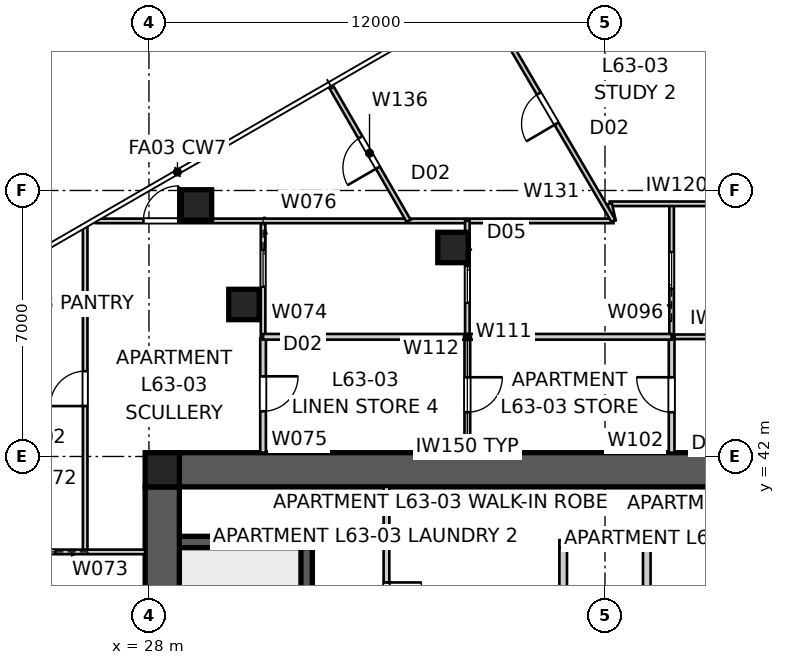
"""IFC4 building model, lengths in metres.
Left out: names, types, materials, properties, quantities, classifications, styles, units other than length and angle.
Written with IfcOpenShell. Run it as: python <this file> out.ifc"""

import sys

from ifc_helpers import new_model, si_unit, direction, frame, frame_2d, origin, origin_2d, place, context, subcontext, project, spatial, polyline, rectangle, outline, extrude, element, fill, save


model = new_model("IFC4")
c1 = context("Model", 3, precision=1e-05, world=origin(), true_north=direction((0.0, 1.0)))
c2 = subcontext(c1, "Body", "Model", "MODEL_VIEW")
j1 = project(units=[si_unit("LENGTHUNIT", "METRE"), si_unit("PLANEANGLEUNIT", "RADIAN")], contexts=[c1])
p1 = place(None, origin())
s1 = spatial("IfcSite", under=j1, at=p1, CompositionType="ELEMENT")
p2 = place(p1, origin())
s2 = spatial("IfcBuilding", under=s1, at=p2, CompositionType="ELEMENT")
p3 = place(p2, frame((0.0, 0.0, 228.6)))
s3 = spatial("IfcBuildingStorey", under=s2, at=p3, CompositionType="ELEMENT", Elevation=228.6)
p4 = place(p3, frame((28.8, 41.65, 0.0), z_axis=(0.0, 0.0, 1.0), x_axis=(1.0, 0.0, 0.0)))
e1 = element("IfcWall", 1, at=p4, inside=s3, PredefinedType="SHEAR", context=c2, shape_type="SweptSolid", body=[
    extrude(outline(polyline([(0.0, -0.45), (22.4, -0.45), (22.4, -0.025), (22.85, -0.025), (22.85, 0.025), (22.4, 0.025), (22.4, 0.45), (0.0, 0.45), (0.0, 0.025), (-0.45, 0.025), (-0.45, -0.025), (0.0, -0.025), (0.0, -0.45)])), origin(), (0.0, 0.0, 1.0), 3.4),
])
p5 = place(p3, frame((28.35, 41.2, 0.0), z_axis=(0.0, 0.0, 1.0), x_axis=(0.0, -1.0, 0.0)))
e2 = element("IfcWall", 2, at=p5, inside=s3, PredefinedType="SHEAR", context=c2, shape_type="SweptSolid", body=[
    extrude(outline(polyline([(0.0, -0.45), (22.4, -0.45), (22.4, -0.025), (22.85, -0.025), (22.85, 0.025), (22.4, 0.025), (22.4, 0.45), (0.0, 0.45), (0.0, 0.025), (-0.45, 0.025), (-0.45, -0.025), (0.0, -0.025), (0.0, -0.45)])), origin(), (0.0, 0.0, 1.0), 3.4),
])
p6 = place(p5, frame((11.14, 0.0, 0.0)))
e3 = element("IfcOpeningElement", 3, at=p6, cuts=e2, PredefinedType="OPENING", context=c2, shape_type="SweptSolid", body=[
    extrude(rectangle(XDim=1.02, YDim=2.4, at=frame_2d((0.51, 1.2))), frame((0.0, 0.46, 0.0), z_axis=(0.0, -1.0, 0.0), x_axis=(1.0, 0.0, 0.0)), (0.0, 0.0, 1.0), 0.92),
])
p7 = place(p3, frame((32.15, 32.2, 0.0), z_axis=(0.0, 0.0, 1.0), x_axis=(0.0, 1.0, 0.0)))
e4 = element("IfcWall", 4, at=p7, inside=s3, PredefinedType="SHEAR", context=c2, shape_type="SweptSolid", body=[
    extrude(rectangle(XDim=7.7, YDim=0.3, at=frame_2d((3.85, 0.0))), origin(), (0.0, 0.0, 1.0), 3.4),
])
p8 = place(p3, frame((28.8, 39.75, 0.0), z_axis=(0.0, 0.0, 1.0), x_axis=(1.0, 0.0, 0.0)))
e5 = element("IfcWall", 5, at=p8, inside=s3, PredefinedType="SHEAR", context=c2, shape_type="SweptSolid", body=[
    extrude(rectangle(XDim=3.5, YDim=0.3, at=frame_2d((1.75, 0.0))), origin(), (0.0, 0.0, 1.0), 3.4),
])
for number, where, z_axis, x_axis in (
    (6, (38.9, 37.6, 0.0), (0.0, 0.0, 1.0), (0.0, 1.0, 0.0)),
    (7, (41.1, 37.6, 0.0), (0.0, 0.0, 1.0), (0.0, 1.0, 0.0)),
):
    element("IfcWall", number, at=place(p3, frame(where, z_axis=z_axis, x_axis=x_axis)), inside=s3, PredefinedType="SOLIDWALL", context=c2, shape_type="SweptSolid", body=[
        extrude(rectangle(XDim=2.0, YDim=0.2, at=frame_2d((1.0, 0.0))), origin(), (0.0, 0.0, 1.0), 3.4),
    ])
p9 = place(p3, frame((38.8, 39.7, 0.0), z_axis=(0.0, 0.0, 1.0), x_axis=(1.0, 0.0, 0.0)))
e8 = element("IfcWall", 8, at=p9, inside=s3, PredefinedType="SOLIDWALL", context=c2, shape_type="SweptSolid", body=[
    extrude(rectangle(XDim=2.4, YDim=0.2, at=frame_2d((1.2, 0.0))), origin(), (0.0, 0.0, 1.0), 3.4),
])
p10 = place(p3, frame((28.35, 41.65, 0.0), z_axis=(0.0, 0.0, 1.0), x_axis=(1.0, 0.0, 0.0)))
e9 = element("IfcColumn", 9, at=p10, inside=s3, PredefinedType="COLUMN", context=c2, shape_type="SweptSolid", body=[
    extrude(rectangle(XDim=0.9, YDim=0.9, at=origin_2d()), origin(), (0.0, 0.0, 1.0), 3.4),
])
for number, where, z_axis, x_axis in (
    (10, (29.25, 48.62, 0.0), (0.0, 0.0, 1.0), (1.0, 0.0, 0.0)),
    (11, (36.0, 47.5, 0.0), (0.0, 0.0, 1.0), (1.0, 0.0, 0.0)),
    (12, (30.5, 46.0, 0.0), (0.0, 0.0, 1.0), (1.0, 0.0, 0.0)),
):
    element("IfcColumn", number, at=place(p3, frame(where, z_axis=z_axis, x_axis=x_axis)), inside=s3, PredefinedType="COLUMN", context=c2, shape_type="SweptSolid", body=[
        extrude(rectangle(XDim=0.8, YDim=0.8, at=origin_2d()), origin(), (0.0, 0.0, 1.0), 3.4),
    ])
p11 = place(p3, frame((34.25, 41.2, 0.0), z_axis=(0.0, 0.0, 1.0), x_axis=(0.0, -1.0, 0.0)))
e13 = element("IfcWall", 13, at=p11, inside=s3, PredefinedType="SOLIDWALL", context=c2, shape_type="SweptSolid", body=[
    extrude(rectangle(XDim=5.95, YDim=0.15, at=frame_2d((2.975, 0.0))), origin(), (0.0, 0.0, 1.0), 3.25),
])
p12 = place(p11, frame((2.515, 0.0, 0.0)))
e14 = element("IfcOpeningElement", 14, at=p12, cuts=e13, PredefinedType="OPENING", context=c2, shape_type="SweptSolid", body=[
    extrude(rectangle(XDim=0.92, YDim=2.1, at=frame_2d((0.46, 1.05))), frame((0.0, 0.085, 0.0), z_axis=(0.0, -1.0, 0.0), x_axis=(1.0, 0.0, 0.0)), (0.0, 0.0, 1.0), 0.17),
])
p13 = place(p3, frame((26.322, 39.49, 0.0), z_axis=(0.0, 0.0, 1.0), x_axis=(0.0, 1.0, 0.0)))
e15 = element("IfcWall", 15, at=p13, inside=s3, PredefinedType="PARTITIONING", context=c2, shape_type="SweptSolid", body=[
    extrude(rectangle(XDim=8.548, YDim=0.12, at=frame_2d((4.274, 0.0))), origin(), (0.0, 0.0, 1.0), 3.25),
])
p14 = place(p13, frame((3.837, 0.0, 0.0)))
e16 = element("IfcOpeningElement", 16, at=p14, cuts=e15, PredefinedType="OPENING", context=c2, shape_type="SweptSolid", body=[
    extrude(rectangle(XDim=0.92, YDim=2.34, at=frame_2d((0.46, 1.17))), frame((0.0, 0.07, 0.0), z_axis=(0.0, -1.0, 0.0), x_axis=(1.0, 0.0, 0.0)), (0.0, 0.0, 1.0), 0.14),
])
p15 = place(p3, frame((27.9, 39.49, 0.0), z_axis=(0.0, 0.0, 1.0), x_axis=(-1.0, 0.0, 0.0)))
e17 = element("IfcWall", 17, at=p15, inside=s3, PredefinedType="PARTITIONING", context=c2, shape_type="SweptSolid", body=[
    extrude(rectangle(XDim=4.116, YDim=0.12, at=frame_2d((2.058, 0.0))), origin(), (0.0, 0.0, 1.0), 3.25),
])
p16 = place(p15, frame((2.367, 0.0, 0.0)))
e18 = element("IfcOpeningElement", 18, at=p16, cuts=e17, PredefinedType="OPENING", context=c2, shape_type="SweptSolid", body=[
    extrude(rectangle(XDim=0.96, YDim=2.1, at=frame_2d((0.48, 1.05))), frame((0.0, 0.07, 0.0), z_axis=(0.0, -1.0, 0.0), x_axis=(1.0, 0.0, 0.0)), (0.0, 0.0, 1.0), 0.14),
])
p17 = place(p3, frame((31.003, 48.2, 0.0), z_axis=(0.0, 0.0, 1.0), x_axis=(0.0, -1.0, 0.0)))
e19 = element("IfcWall", 19, at=p17, inside=s3, PredefinedType="PARTITIONING", context=c2, shape_type="SweptSolid", body=[
    extrude(rectangle(XDim=3.1, YDim=0.12, at=frame_2d((1.55, 0.0))), origin(), (0.0, 0.0, 1.0), 3.25),
])
p18 = place(p17, frame((0.77, 0.0, 0.0)))
e20 = element("IfcOpeningElement", 20, at=p18, cuts=e19, PredefinedType="OPENING", context=c2, shape_type="SweptSolid", body=[
    extrude(rectangle(XDim=0.96, YDim=2.1, at=frame_2d((0.48, 1.05))), frame((0.0, 0.07, 0.0), z_axis=(0.0, -1.0, 0.0), x_axis=(1.0, 0.0, 0.0)), (0.0, 0.0, 1.0), 0.14),
])
p19 = place(p3, frame((31.003, 45.1, 0.0), z_axis=(0.0, 0.0, 1.0), x_axis=(0.0, -1.0, 0.0)))
e21 = element("IfcWall", 21, at=p19, inside=s3, PredefinedType="SOLIDWALL", context=c2, shape_type="SweptSolid", body=[
    extrude(rectangle(XDim=3.0, YDim=0.15, at=frame_2d((1.5, 0.0))), origin(), (0.0, 0.0, 1.0), 3.25),
])
p20 = place(p19, frame((0.99, 0.0, 0.0)))
e22 = element("IfcOpeningElement", 22, at=p20, cuts=e21, PredefinedType="OPENING", context=c2, shape_type="SweptSolid", body=[
    extrude(rectangle(XDim=0.92, YDim=2.34, at=frame_2d((0.46, 1.17))), frame((0.0, 0.085, 0.0), z_axis=(0.0, -1.0, 0.0), x_axis=(1.0, 0.0, 0.0)), (0.0, 0.0, 1.0), 0.17),
])
p21 = place(p3, frame((26.603, 48.2, 0.0), z_axis=(0.0, 0.0, 1.0), x_axis=(1.0, 0.0, 0.0)))
e23 = element("IfcWall", 23, at=p21, inside=s3, PredefinedType="PARTITIONING", context=c2, shape_type="SweptSolid", body=[
    extrude(rectangle(XDim=13.62, YDim=0.12, at=frame_2d((6.81, 0.0))), origin(), (0.0, 0.0, 1.0), 3.25),
])
p22 = place(p21, frame((1.25, 0.0, 0.0)))
e24 = element("IfcOpeningElement", 24, at=p22, cuts=e23, PredefinedType="OPENING", context=c2, shape_type="SweptSolid", body=[
    extrude(rectangle(XDim=0.92, YDim=2.1, at=frame_2d((0.46, 1.05))), frame((0.0, 0.07, 0.0), z_axis=(0.0, -1.0, 0.0), x_axis=(1.0, 0.0, 0.0)), (0.0, 0.0, 1.0), 0.14),
])
p23 = place(p3, frame((46.074, 45.15, 0.0), z_axis=(0.0, 0.0, 1.0), x_axis=(-1.0, 0.0, 0.0)))
e25 = element("IfcWall", 25, at=p23, inside=s3, PredefinedType="PARTITIONING", context=c2, shape_type="SweptSolid", body=[
    extrude(rectangle(XDim=4.321, YDim=0.12, at=frame_2d((2.16, 0.0))), origin(), (0.0, 0.0, 1.0), 3.25),
])
p24 = place(p3, frame((41.753, 45.15, 0.0), z_axis=(0.0, 0.0, 1.0), x_axis=(0.0, 1.0, 0.0)))
e26 = element("IfcWall", 26, at=p24, inside=s3, PredefinedType="PARTITIONING", context=c2, shape_type="SweptSolid", body=[
    extrude(rectangle(XDim=3.5, YDim=0.12, at=frame_2d((1.75, 0.0))), origin(), (0.0, 0.0, 1.0), 3.25),
])
p25 = place(p24, frame((1.27, 0.0, 0.0)))
e27 = element("IfcOpeningElement", 27, at=p25, cuts=e26, PredefinedType="OPENING", context=c2, shape_type="SweptSolid", body=[
    extrude(rectangle(XDim=0.96, YDim=2.1, at=frame_2d((0.48, 1.05))), frame((0.0, 0.07, 0.0), z_axis=(0.0, -1.0, 0.0), x_axis=(1.0, 0.0, 0.0)), (0.0, 0.0, 1.0), 0.14),
])
p26 = place(p3, frame((40.123, 48.65, 0.0), z_axis=(0.0, 0.0, 1.0), x_axis=(1.0, 0.0, 0.0)))
e28 = element("IfcWall", 28, at=p26, inside=s3, PredefinedType="PARTITIONING", context=c2, shape_type="SweptSolid", body=[
    extrude(rectangle(XDim=3.53, YDim=0.12, at=frame_2d((1.765, 0.0))), origin(), (0.0, 0.0, 1.0), 3.25),
])
p27 = place(p3, frame((40.786, 56.388, 0.0), z_axis=(0.0, 0.0, 1.0), x_axis=(0.49999364752, -0.86602907136, 0.0)))
e29 = element("IfcWall", 29, at=p27, inside=s3, PredefinedType="PARTITIONING", context=c2, shape_type="SweptSolid", body=[
    extrude(rectangle(XDim=9.455, YDim=0.12, at=frame_2d((4.728, 0.0))), origin(), (0.0, 0.0, 1.0), 3.25),
])
p28 = place(p27, frame((1.681, 0.0, 0.0)))
e30 = element("IfcOpeningElement", 30, at=p28, cuts=e29, PredefinedType="OPENING", context=c2, shape_type="SweptSolid", body=[
    extrude(rectangle(XDim=0.92, YDim=2.34, at=frame_2d((0.46, 1.17))), frame((0.0, 0.07, 0.0), z_axis=(0.0, -1.0, 0.0), x_axis=(1.0, 0.0, 0.0)), (0.0, 0.0, 1.0), 0.14),
])
p29 = place(p27, frame((5.726, 0.0, 0.0)))
e31 = element("IfcOpeningElement", 31, at=p29, cuts=e29, PredefinedType="OPENING", context=c2, shape_type="SweptSolid", body=[
    extrude(rectangle(XDim=0.92, YDim=2.34, at=frame_2d((0.46, 1.17))), frame((0.0, 0.07, 0.0), z_axis=(0.0, -1.0, 0.0), x_axis=(1.0, 0.0, 0.0)), (0.0, 0.0, 1.0), 0.14),
])
p30 = place(p3, frame((41.753, 42.1, 0.0), z_axis=(0.0, 0.0, 1.0), x_axis=(0.0, 1.0, 0.0)))
e32 = element("IfcWall", 32, at=p30, inside=s3, PredefinedType="SOLIDWALL", context=c2, shape_type="SweptSolid", body=[
    extrude(rectangle(XDim=3.05, YDim=0.15, at=frame_2d((1.525, 0.0))), origin(), (0.0, 0.0, 1.0), 3.25),
])
p31 = place(p30, frame((1.065, 0.0, 0.0)))
e33 = element("IfcOpeningElement", 33, at=p31, cuts=e32, PredefinedType="OPENING", context=c2, shape_type="SweptSolid", body=[
    extrude(rectangle(XDim=0.92, YDim=2.34, at=frame_2d((0.46, 1.17))), frame((0.0, 0.085, 0.0), z_axis=(0.0, -1.0, 0.0), x_axis=(1.0, 0.0, 0.0)), (0.0, 0.0, 1.0), 0.17),
])
p32 = place(p3, frame((41.753, 45.15, 0.0), z_axis=(0.0, 0.0, 1.0), x_axis=(-1.0, 0.0, 0.0)))
e34 = element("IfcWall", 34, at=p32, inside=s3, PredefinedType="SOLIDWALL", context=c2, shape_type="SweptSolid", body=[
    extrude(rectangle(XDim=10.751, YDim=0.15, at=frame_2d((5.375, 0.0))), origin(), (0.0, 0.0, 1.0), 3.25),
])
p33 = place(p3, frame((36.378, 48.2, 0.0), z_axis=(0.0, 0.0, 1.0), x_axis=(0.0, -1.0, 0.0)))
e35 = element("IfcWall", 35, at=p33, inside=s3, PredefinedType="PARTITIONING", context=c2, shape_type="SweptSolid", body=[
    extrude(rectangle(XDim=3.05, YDim=0.12, at=frame_2d((1.525, 0.0))), origin(), (0.0, 0.0, 1.0), 3.25),
])
p34 = place(p33, frame((1.195, 0.0, 0.0)))
e36 = element("IfcOpeningElement", 36, at=p34, cuts=e35, PredefinedType="OPENING", context=c2, shape_type="SweptSolid", body=[
    extrude(rectangle(XDim=0.96, YDim=2.1, at=frame_2d((0.48, 1.05))), frame((0.0, 0.07, 0.0), z_axis=(0.0, -1.0, 0.0), x_axis=(1.0, 0.0, 0.0)), (0.0, 0.0, 1.0), 0.14),
])
p35 = place(p3, frame((36.378, 45.15, 0.0), z_axis=(0.0, 0.0, 1.0), x_axis=(0.0, -1.0, 0.0)))
e37 = element("IfcWall", 37, at=p35, inside=s3, PredefinedType="SOLIDWALL", context=c2, shape_type="SweptSolid", body=[
    extrude(rectangle(XDim=3.05, YDim=0.15, at=frame_2d((1.525, 0.0))), origin(), (0.0, 0.0, 1.0), 3.25),
])
p36 = place(p35, frame((1.065, 0.0, 0.0)))
e38 = element("IfcOpeningElement", 38, at=p36, cuts=e37, PredefinedType="OPENING", context=c2, shape_type="SweptSolid", body=[
    extrude(rectangle(XDim=0.92, YDim=2.34, at=frame_2d((0.46, 1.17))), frame((0.0, 0.085, 0.0), z_axis=(0.0, -1.0, 0.0), x_axis=(1.0, 0.0, 0.0)), (0.0, 0.0, 1.0), 0.17),
])
p37 = place(p3, frame((40.223, 48.2, 0.0), z_axis=(0.0, 0.0, 1.0), x_axis=(-0.21665001594, 0.976249338332, 0.0)))
e39 = element("IfcWall", 39, at=p37, inside=s3, PredefinedType="PARTITIONING", context=c2, shape_type="SweptSolid", body=[
    extrude(rectangle(XDim=0.461, YDim=0.12, at=frame_2d((0.23, 0.0))), origin(), (0.0, 0.0, 1.0), 3.25),
])
p38 = place(p3, frame((40.223, 48.2, 0.0), z_axis=(0.0, 0.0, 1.0), x_axis=(-0.505457259534, 0.862851643554, 0.0)))
e40 = element("IfcWall", 40, at=p38, inside=s3, PredefinedType="PARTITIONING", context=c2, shape_type="SweptSolid", body=[
    extrude(rectangle(XDim=6.81, YDim=0.12, at=frame_2d((3.405, 0.0))), origin(), (0.0, 0.0, 1.0), 3.25),
])
p39 = place(p38, frame((2.965, 0.0, 0.0)))
e41 = element("IfcOpeningElement", 41, at=p39, cuts=e40, PredefinedType="OPENING", context=c2, shape_type="SweptSolid", body=[
    extrude(rectangle(XDim=0.92, YDim=2.34, at=frame_2d((0.46, 1.17))), frame((0.0, 0.07, 0.0), z_axis=(0.0, -1.0, 0.0), x_axis=(1.0, 0.0, 0.0)), (0.0, 0.0, 1.0), 0.14),
])
p40 = place(p3, frame((34.833, 48.2, 0.0), z_axis=(0.0, 0.0, 1.0), x_axis=(-0.499999798456, 0.866025520146, 0.0)))
e42 = element("IfcWall", 42, at=p40, inside=s3, PredefinedType="PARTITIONING", context=c2, shape_type="SweptSolid", body=[
    extrude(rectangle(XDim=4.115, YDim=0.12, at=frame_2d((2.057, 0.0))), origin(), (0.0, 0.0, 1.0), 3.25),
])
p41 = place(p40, frame((1.617, 0.0, 0.0)))
e43 = element("IfcOpeningElement", 43, at=p41, cuts=e42, PredefinedType="OPENING", context=c2, shape_type="SweptSolid", body=[
    extrude(rectangle(XDim=0.92, YDim=2.34, at=frame_2d((0.46, 1.17))), frame((0.0, 0.07, 0.0), z_axis=(0.0, -1.0, 0.0), x_axis=(1.0, 0.0, 0.0)), (0.0, 0.0, 1.0), 0.14),
])
p42 = place(p12, origin())
e44 = element("IfcDoor", 44, at=p42, inside=s3, OperationType="SINGLE_SWING_LEFT", PredefinedType="DOOR", context=c2, shape_type="SweptSolid", body=[
    extrude(rectangle(XDim=0.92, YDim=2.1, at=frame_2d((0.46, 1.05))), frame((0.0, 0.025, 0.0), z_axis=(0.0, -1.0, 0.0), x_axis=(1.0, 0.0, 0.0)), (0.0, 0.0, 1.0), 0.05),
])
fill(e14, e44)
p43 = place(p14, origin())
e45 = element("IfcDoor", 45, at=p43, inside=s3, OperationType="SINGLE_SWING_LEFT", PredefinedType="DOOR", context=c2, shape_type="SweptSolid", body=[
    extrude(rectangle(XDim=0.92, YDim=2.34, at=frame_2d((0.46, 1.17))), frame((0.0, 0.025, 0.0), z_axis=(0.0, -1.0, 0.0), x_axis=(1.0, 0.0, 0.0)), (0.0, 0.0, 1.0), 0.05),
])
fill(e16, e45)
p44 = place(p16, origin())
e46 = element("IfcDoor", 46, at=p44, inside=s3, OperationType="SLIDING_TO_LEFT", PredefinedType="DOOR", context=c2, shape_type="SweptSolid", body=[
    extrude(rectangle(XDim=0.96, YDim=2.1, at=frame_2d((0.48, 1.05))), frame((0.0, 0.025, 0.0), z_axis=(0.0, -1.0, 0.0), x_axis=(1.0, 0.0, 0.0)), (0.0, 0.0, 1.0), 0.05),
])
fill(e18, e46)
p45 = place(p22, origin())
e47 = element("IfcDoor", 47, at=p45, inside=s3, OperationType="SINGLE_SWING_RIGHT", PredefinedType="DOOR", context=c2, shape_type="SweptSolid", body=[
    extrude(rectangle(XDim=0.92, YDim=2.1, at=frame_2d((0.46, 1.05))), frame((0.0, 0.025, 0.0), z_axis=(0.0, -1.0, 0.0), x_axis=(1.0, 0.0, 0.0)), (0.0, 0.0, 1.0), 0.05),
])
fill(e24, e47)
p46 = place(p18, origin())
e48 = element("IfcDoor", 48, at=p46, inside=s3, OperationType="SLIDING_TO_LEFT", PredefinedType="DOOR", context=c2, shape_type="SweptSolid", body=[
    extrude(rectangle(XDim=0.96, YDim=2.1, at=frame_2d((0.48, 1.05))), frame((0.0, 0.025, 0.0), z_axis=(0.0, -1.0, 0.0), x_axis=(1.0, 0.0, 0.0)), (0.0, 0.0, 1.0), 0.05),
])
fill(e20, e48)
p47 = place(p20, origin())
e49 = element("IfcDoor", 49, at=p47, inside=s3, OperationType="SINGLE_SWING_LEFT", PredefinedType="DOOR", context=c2, shape_type="SweptSolid", body=[
    extrude(rectangle(XDim=0.92, YDim=2.34, at=frame_2d((0.46, 1.17))), frame((0.0, 0.025, 0.0), z_axis=(0.0, -1.0, 0.0), x_axis=(1.0, 0.0, 0.0)), (0.0, 0.0, 1.0), 0.05),
])
fill(e22, e49)
p48 = place(p41, origin())
e50 = element("IfcDoor", 50, at=p48, inside=s3, OperationType="SINGLE_SWING_LEFT", PredefinedType="DOOR", context=c2, shape_type="SweptSolid", body=[
    extrude(rectangle(XDim=0.92, YDim=2.34, at=frame_2d((0.46, 1.17))), frame((0.0, 0.025, 0.0), z_axis=(0.0, -1.0, 0.0), x_axis=(1.0, 0.0, 0.0)), (0.0, 0.0, 1.0), 0.05),
])
fill(e43, e50)
p49 = place(p34, origin())
e51 = element("IfcDoor", 51, at=p49, inside=s3, OperationType="SLIDING_TO_LEFT", PredefinedType="DOOR", context=c2, shape_type="SweptSolid", body=[
    extrude(rectangle(XDim=0.96, YDim=2.1, at=frame_2d((0.48, 1.05))), frame((0.0, 0.025, 0.0), z_axis=(0.0, -1.0, 0.0), x_axis=(1.0, 0.0, 0.0)), (0.0, 0.0, 1.0), 0.05),
])
fill(e36, e51)
p50 = place(p36, origin())
e52 = element("IfcDoor", 52, at=p50, inside=s3, OperationType="SINGLE_SWING_LEFT", PredefinedType="DOOR", context=c2, shape_type="SweptSolid", body=[
    extrude(rectangle(XDim=0.92, YDim=2.34, at=frame_2d((0.46, 1.17))), frame((0.0, 0.025, 0.0), z_axis=(0.0, -1.0, 0.0), x_axis=(1.0, 0.0, 0.0)), (0.0, 0.0, 1.0), 0.05),
])
fill(e38, e52)
p51 = place(p39, origin())
e53 = element("IfcDoor", 53, at=p51, inside=s3, OperationType="SINGLE_SWING_LEFT", PredefinedType="DOOR", context=c2, shape_type="SweptSolid", body=[
    extrude(rectangle(XDim=0.92, YDim=2.34, at=frame_2d((0.46, 1.17))), frame((0.0, 0.025, 0.0), z_axis=(0.0, -1.0, 0.0), x_axis=(1.0, 0.0, 0.0)), (0.0, 0.0, 1.0), 0.05),
])
fill(e41, e53)
p52 = place(p25, origin())
e54 = element("IfcDoor", 54, at=p52, inside=s3, OperationType="SLIDING_TO_LEFT", PredefinedType="DOOR", context=c2, shape_type="SweptSolid", body=[
    extrude(rectangle(XDim=0.96, YDim=2.1, at=frame_2d((0.48, 1.05))), frame((0.0, 0.025, 0.0), z_axis=(0.0, -1.0, 0.0), x_axis=(1.0, 0.0, 0.0)), (0.0, 0.0, 1.0), 0.05),
])
fill(e27, e54)
p53 = place(p31, origin())
e55 = element("IfcDoor", 55, at=p53, inside=s3, OperationType="SINGLE_SWING_RIGHT", PredefinedType="DOOR", context=c2, shape_type="SweptSolid", body=[
    extrude(rectangle(XDim=0.92, YDim=2.34, at=frame_2d((0.46, 1.17))), frame((0.0, 0.025, 0.0), z_axis=(0.0, -1.0, 0.0), x_axis=(1.0, 0.0, 0.0)), (0.0, 0.0, 1.0), 0.05),
])
fill(e33, e55)
save(model, sys.argv[1])
